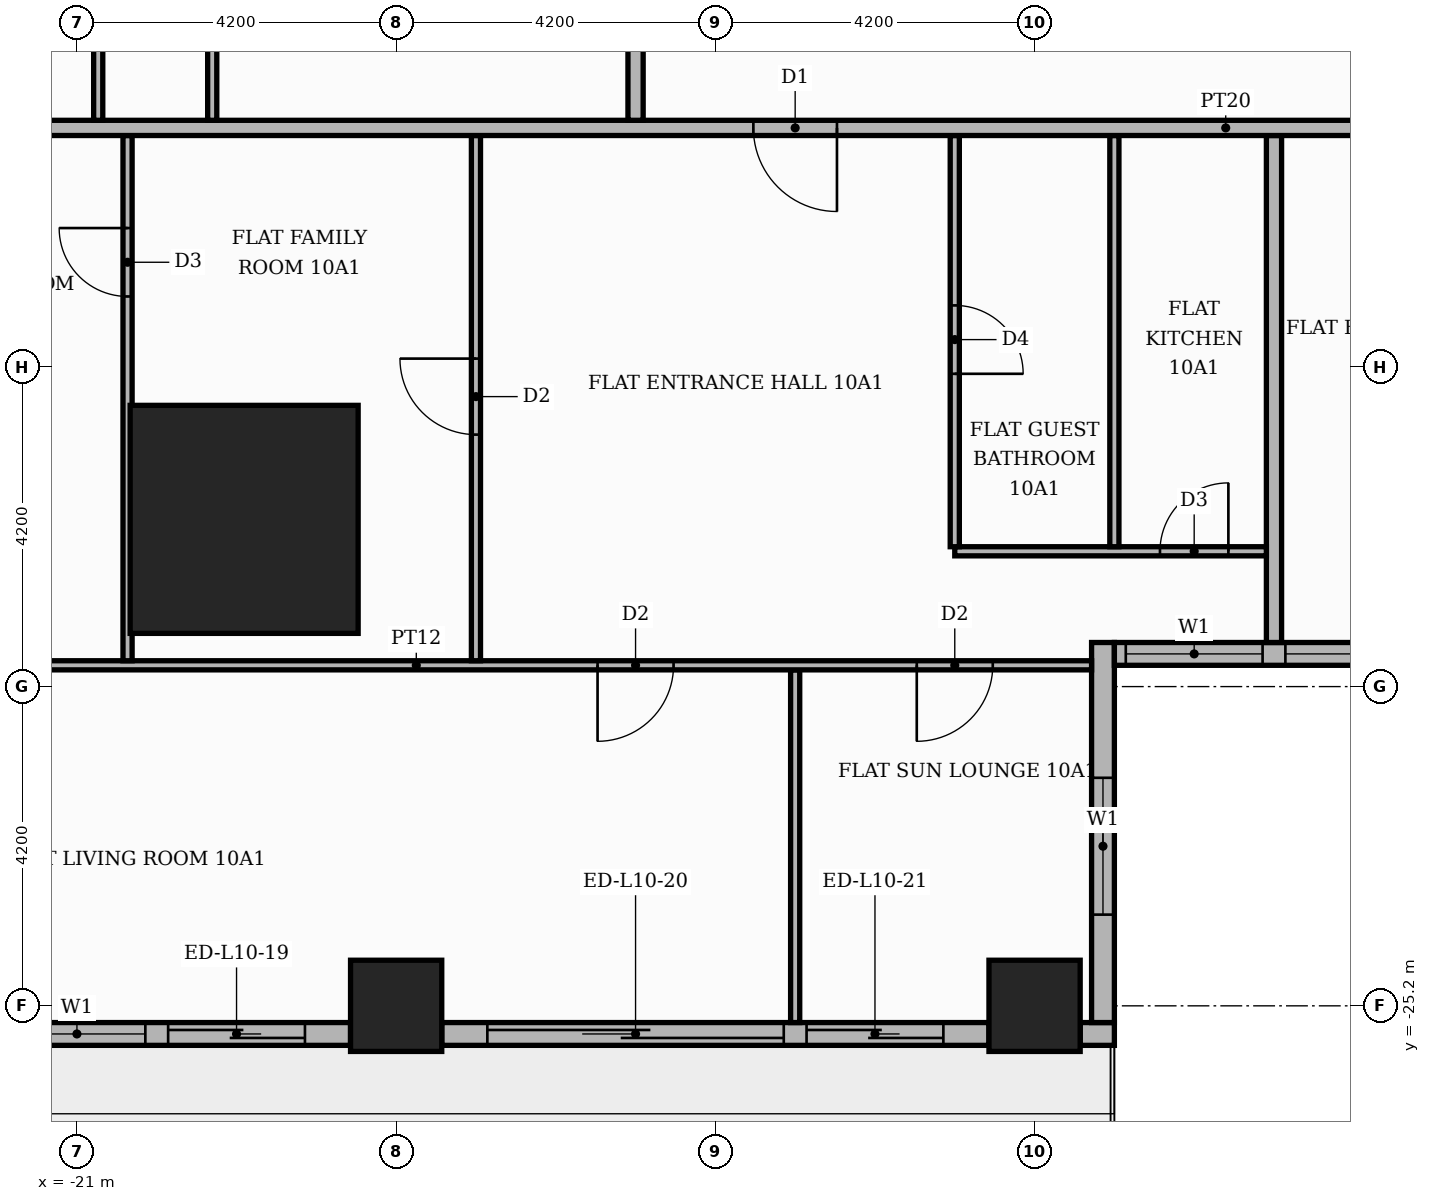
"""IFC4 building model, lengths in metres.
Left out: names, types, materials, properties, quantities, classifications, styles, units other than length and angle.
Written with IfcOpenShell. Run it as: python <this file> out.ifc"""

import sys

from ifc_helpers import new_model, si_unit, direction, frame, frame_2d, origin, origin_2d, place, context, subcontext, project, spatial, rectangle, extrude, element, fill, save


model = new_model("IFC4")
c1 = context("Model", 3, precision=1e-05, world=origin(), true_north=direction((0.0, 1.0)))
c2 = subcontext(c1, "Body", "Model", "MODEL_VIEW")
j1 = project(units=[si_unit("LENGTHUNIT", "METRE"), si_unit("PLANEANGLEUNIT", "RADIAN")], contexts=[c1])
p1 = place(None, origin())
s1 = spatial("IfcSite", under=j1, at=p1, CompositionType="ELEMENT")
p2 = place(p1, origin())
s2 = spatial("IfcBuilding", under=s1, at=p2, CompositionType="ELEMENT")
p3 = place(p2, frame((0.0, 0.0, 46.5)))
s3 = spatial("IfcBuildingStorey", under=s2, at=p3, CompositionType="ELEMENT", Elevation=46.5)
p4 = place(p3, frame((-18.8, -18.8, 0.0), z_axis=(0.0, 0.0, 1.0), x_axis=(1.0, 0.0, 0.0)))
e1 = element("IfcColumn", 1, at=p4, inside=s3, PredefinedType="COLUMN", context=c2, shape_type="SweptSolid", body=[
    extrude(rectangle(XDim=3.0, YDim=3.0, at=origin_2d()), origin(), (0.0, 0.0, 1.0), 3.9),
])
for number, where, z_axis, x_axis in (
    (2, (-8.4, -25.2, 0.0), (0.0, 0.0, 1.0), (1.0, 0.0, 0.0)),
    (3, (-16.8, -25.2, 0.0), (0.0, 0.0, 1.0), (1.0, 0.0, 0.0)),
):
    element("IfcColumn", number, at=place(p3, frame(where, z_axis=z_axis, x_axis=x_axis)), inside=s3, PredefinedType="COLUMN", context=c2, shape_type="SweptSolid", body=[
        extrude(rectangle(XDim=1.2, YDim=1.2, at=origin_2d()), origin(), (0.0, 0.0, 1.0), 3.9),
    ])
p5 = place(p3, frame((-22.42, -25.57, 0.0), z_axis=(0.0, 0.0, 1.0), x_axis=(1.0, 0.0, 0.0)))
e4 = element("IfcWall", 4, at=p5, inside=s3, PredefinedType="STANDARD", context=c2, shape_type="SweptSolid", body=[
    extrude(rectangle(XDim=5.02, YDim=0.3, at=frame_2d((2.51, 0.0))), origin(), (0.0, 0.0, 1.0), 3.48),
])
p6 = place(p5, frame((0.52, 0.0, 0.9)))
e5 = element("IfcOpeningElement", 5, at=p6, cuts=e4, PredefinedType="OPENING", context=c2, shape_type="SweptSolid", body=[
    extrude(rectangle(XDim=1.8, YDim=2.1, at=frame_2d((0.9, 1.05))), frame((0.0, 0.16, 0.0), z_axis=(0.0, -1.0, 0.0), x_axis=(1.0, 0.0, 0.0)), (0.0, 0.0, 1.0), 0.32),
])
p7 = place(p5, frame((2.62, 0.0, 0.0)))
e6 = element("IfcOpeningElement", 6, at=p7, cuts=e4, PredefinedType="OPENING", context=c2, shape_type="SweptSolid", body=[
    extrude(rectangle(XDim=1.8, YDim=2.4, at=frame_2d((0.9, 1.2))), frame((0.0, 0.16, 0.0), z_axis=(0.0, -1.0, 0.0), x_axis=(1.0, 0.0, 0.0)), (0.0, 0.0, 1.0), 0.32),
])
p8 = place(p3, frame((-16.2, -25.57, 0.0), z_axis=(0.0, 0.0, 1.0), x_axis=(1.0, 0.0, 0.0)))
e7 = element("IfcWall", 7, at=p8, inside=s3, PredefinedType="STANDARD", context=c2, shape_type="SweptSolid", body=[
    extrude(rectangle(XDim=7.2, YDim=0.3, at=frame_2d((3.6, 0.0))), origin(), (0.0, 0.0, 1.0), 3.48),
])
p9 = place(p8, frame((0.6, 0.0, 0.0)))
e8 = element("IfcOpeningElement", 8, at=p9, cuts=e7, PredefinedType="OPENING", context=c2, shape_type="SweptSolid", body=[
    extrude(rectangle(XDim=3.9, YDim=2.4, at=frame_2d((1.95, 1.2))), frame((0.0, 0.16, 0.0), z_axis=(0.0, -1.0, 0.0), x_axis=(1.0, 0.0, 0.0)), (0.0, 0.0, 1.0), 0.32),
])
p10 = place(p8, frame((4.8, 0.0, 0.0)))
e9 = element("IfcOpeningElement", 9, at=p10, cuts=e7, PredefinedType="OPENING", context=c2, shape_type="SweptSolid", body=[
    extrude(rectangle(XDim=1.8, YDim=2.4, at=frame_2d((0.9, 1.2))), frame((0.0, 0.16, 0.0), z_axis=(0.0, -1.0, 0.0), x_axis=(1.0, 0.0, 0.0)), (0.0, 0.0, 1.0), 0.32),
])
p11 = place(p3, frame((-7.8, -25.57, 0.0), z_axis=(0.0, 0.0, 1.0), x_axis=(1.0, 0.0, 0.0)))
e10 = element("IfcWall", 10, at=p11, inside=s3, PredefinedType="STANDARD", context=c2, shape_type="SweptSolid", body=[
    extrude(rectangle(XDim=0.45, YDim=0.3, at=frame_2d((0.225, 0.0))), origin(), (0.0, 0.0, 1.0), 3.48),
])
p12 = place(p3, frame((-7.5, -25.42, 0.0), z_axis=(0.0, 0.0, 1.0), x_axis=(0.0, 1.0, 0.0)))
e11 = element("IfcWall", 11, at=p12, inside=s3, PredefinedType="STANDARD", context=c2, shape_type="SweptSolid", body=[
    extrude(rectangle(XDim=5.0, YDim=0.3, at=frame_2d((2.5, 0.0))), origin(), (0.0, 0.0, 1.0), 3.48),
])
p13 = place(p12, frame((1.42, 0.0, 0.9)))
e12 = element("IfcOpeningElement", 12, at=p13, cuts=e11, PredefinedType="OPENING", context=c2, shape_type="SweptSolid", body=[
    extrude(rectangle(XDim=1.8, YDim=2.1, at=frame_2d((0.9, 1.05))), frame((0.0, 0.16, 0.0), z_axis=(0.0, -1.0, 0.0), x_axis=(1.0, 0.0, 0.0)), (0.0, 0.0, 1.0), 0.32),
])
p14 = place(p3, frame((-7.35, -20.57, 0.0), z_axis=(0.0, 0.0, 1.0), x_axis=(1.0, 0.0, 0.0)))
e13 = element("IfcWall", 13, at=p14, inside=s3, PredefinedType="STANDARD", context=c2, shape_type="SweptSolid", body=[
    extrude(rectangle(XDim=15.0, YDim=0.3, at=frame_2d((7.5, 0.0))), origin(), (0.0, 0.0, 1.0), 3.48),
])
p15 = place(p14, frame((0.15, 0.0, 0.9)))
e14 = element("IfcOpeningElement", 14, at=p15, cuts=e13, PredefinedType="OPENING", context=c2, shape_type="SweptSolid", body=[
    extrude(rectangle(XDim=1.8, YDim=2.1, at=frame_2d((0.9, 1.05))), frame((0.0, 0.16, 0.0), z_axis=(0.0, -1.0, 0.0), x_axis=(1.0, 0.0, 0.0)), (0.0, 0.0, 1.0), 0.32),
])
p16 = place(p14, frame((2.25, 0.0, 0.9)))
e15 = element("IfcOpeningElement", 15, at=p16, cuts=e13, PredefinedType="OPENING", context=c2, shape_type="SweptSolid", body=[
    extrude(rectangle(XDim=6.0, YDim=2.1, at=frame_2d((3.0, 1.05))), frame((0.0, 0.16, 0.0), z_axis=(0.0, -1.0, 0.0), x_axis=(1.0, 0.0, 0.0)), (0.0, 0.0, 1.0), 0.32),
])
p17 = place(p14, frame((8.55, 0.0, 0.9)))
e16 = element("IfcOpeningElement", 16, at=p17, cuts=e13, PredefinedType="OPENING", context=c2, shape_type="SweptSolid", body=[
    extrude(rectangle(XDim=6.0, YDim=2.1, at=frame_2d((3.0, 1.05))), frame((0.0, 0.16, 0.0), z_axis=(0.0, -1.0, 0.0), x_axis=(1.0, 0.0, 0.0)), (0.0, 0.0, 1.0), 0.32),
])
p18 = place(p3, frame((-11.55, -25.42, 0.0), z_axis=(0.0, 0.0, 1.0), x_axis=(0.0, 1.0, 0.0)))
e17 = element("IfcWall", 17, at=p18, inside=s3, PredefinedType="PARTITIONING", context=c2, shape_type="SweptSolid", body=[
    extrude(rectangle(XDim=4.64, YDim=0.12, at=frame_2d((2.32, 0.0))), origin(), (0.0, 0.0, 1.0), 3.48),
])
p19 = place(p3, frame((-25.42, -20.72, 0.0), z_axis=(0.0, 0.0, 1.0), x_axis=(1.0, 0.0, 0.0)))
e18 = element("IfcWall", 18, at=p19, inside=s3, PredefinedType="PARTITIONING", context=c2, shape_type="SweptSolid", body=[
    extrude(rectangle(XDim=17.77, YDim=0.12, at=frame_2d((8.885, 0.0))), origin(), (0.0, 0.0, 1.0), 3.48),
])
p20 = place(p19, frame((11.27, 0.0, 0.0)))
e19 = element("IfcOpeningElement", 19, at=p20, cuts=e18, PredefinedType="OPENING", context=c2, shape_type="SweptSolid", body=[
    extrude(rectangle(XDim=1.0, YDim=2.1, at=frame_2d((0.5, 1.05))), frame((0.0, 0.07, 0.0), z_axis=(0.0, -1.0, 0.0), x_axis=(1.0, 0.0, 0.0)), (0.0, 0.0, 1.0), 0.14),
])
p21 = place(p19, frame((15.47, 0.0, 0.0)))
e20 = element("IfcOpeningElement", 20, at=p21, cuts=e18, PredefinedType="OPENING", context=c2, shape_type="SweptSolid", body=[
    extrude(rectangle(XDim=1.0, YDim=2.1, at=frame_2d((0.5, 1.05))), frame((0.0, 0.07, 0.0), z_axis=(0.0, -1.0, 0.0), x_axis=(1.0, 0.0, 0.0)), (0.0, 0.0, 1.0), 0.14),
])
p22 = place(p3, frame((-5.25, -20.42, 0.0), z_axis=(0.0, 0.0, 1.0), x_axis=(0.0, 1.0, 0.0)))
e21 = element("IfcWall", 21, at=p22, inside=s3, PredefinedType="PARTITIONING", context=c2, shape_type="SweptSolid", body=[
    extrude(rectangle(XDim=6.67, YDim=0.2, at=frame_2d((3.335, 0.0))), origin(), (0.0, 0.0, 1.0), 3.48),
])
p23 = place(p3, frame((-20.334, -20.66, 0.0), z_axis=(0.0, 0.0, 1.0), x_axis=(0.0, 1.0, 0.0)))
e22 = element("IfcWall", 22, at=p23, inside=s3, PredefinedType="PARTITIONING", context=c2, shape_type="SweptSolid", body=[
    extrude(rectangle(XDim=6.91, YDim=0.12, at=frame_2d((3.455, 0.0))), origin(), (0.0, 0.0, 1.0), 3.48),
])
p24 = place(p23, frame((4.792, 0.0, 0.0)))
e23 = element("IfcOpeningElement", 23, at=p24, cuts=e22, PredefinedType="OPENING", context=c2, shape_type="SweptSolid", body=[
    extrude(rectangle(XDim=0.9, YDim=2.1, at=frame_2d((0.45, 1.05))), frame((0.0, 0.07, 0.0), z_axis=(0.0, -1.0, 0.0), x_axis=(1.0, 0.0, 0.0)), (0.0, 0.0, 1.0), 0.14),
])
p25 = place(p3, frame((-15.75, -20.66, 0.0), z_axis=(0.0, 0.0, 1.0), x_axis=(0.0, 1.0, 0.0)))
e24 = element("IfcWall", 24, at=p25, inside=s3, PredefinedType="PARTITIONING", context=c2, shape_type="SweptSolid", body=[
    extrude(rectangle(XDim=6.91, YDim=0.12, at=frame_2d((3.455, 0.0))), origin(), (0.0, 0.0, 1.0), 3.48),
])
p26 = place(p25, frame((2.975, 0.0, 0.0)))
e25 = element("IfcOpeningElement", 25, at=p26, cuts=e24, PredefinedType="OPENING", context=c2, shape_type="SweptSolid", body=[
    extrude(rectangle(XDim=1.0, YDim=2.1, at=frame_2d((0.5, 1.05))), frame((0.0, 0.07, 0.0), z_axis=(0.0, -1.0, 0.0), x_axis=(1.0, 0.0, 0.0)), (0.0, 0.0, 1.0), 0.14),
])
p27 = place(p3, frame((-9.45, -19.22, 0.0), z_axis=(0.0, 0.0, 1.0), x_axis=(1.0, 0.0, 0.0)))
e26 = element("IfcWall", 26, at=p27, inside=s3, PredefinedType="PARTITIONING", context=c2, shape_type="SweptSolid", body=[
    extrude(rectangle(XDim=4.1, YDim=0.12, at=frame_2d((2.05, 0.0))), origin(), (0.0, 0.0, 1.0), 3.48),
])
p28 = place(p27, frame((2.7, 0.0, 0.0)))
e27 = element("IfcOpeningElement", 27, at=p28, cuts=e26, PredefinedType="OPENING", context=c2, shape_type="SweptSolid", body=[
    extrude(rectangle(XDim=0.9, YDim=2.1, at=frame_2d((0.45, 1.05))), frame((0.0, 0.07, 0.0), z_axis=(0.0, -1.0, 0.0), x_axis=(1.0, 0.0, 0.0)), (0.0, 0.0, 1.0), 0.14),
])
p29 = place(p3, frame((-9.45, -19.16, 0.0), z_axis=(0.0, 0.0, 1.0), x_axis=(0.0, 1.0, 0.0)))
e28 = element("IfcWall", 28, at=p29, inside=s3, PredefinedType="PARTITIONING", context=c2, shape_type="SweptSolid", body=[
    extrude(rectangle(XDim=5.41, YDim=0.12, at=frame_2d((2.705, 0.0))), origin(), (0.0, 0.0, 1.0), 3.48),
])
p30 = place(p29, frame((2.275, 0.0, 0.0)))
e29 = element("IfcOpeningElement", 29, at=p30, cuts=e28, PredefinedType="OPENING", context=c2, shape_type="SweptSolid", body=[
    extrude(rectangle(XDim=0.9, YDim=2.1, at=frame_2d((0.45, 1.05))), frame((0.0, 0.07, 0.0), z_axis=(0.0, -1.0, 0.0), x_axis=(1.0, 0.0, 0.0)), (0.0, 0.0, 1.0), 0.14),
])
p31 = place(p3, frame((-7.35, -19.16, 0.0), z_axis=(0.0, 0.0, 1.0), x_axis=(0.0, 1.0, 0.0)))
e30 = element("IfcWall", 30, at=p31, inside=s3, PredefinedType="PARTITIONING", context=c2, shape_type="SweptSolid", body=[
    extrude(rectangle(XDim=5.41, YDim=0.12, at=frame_2d((2.705, 0.0))), origin(), (0.0, 0.0, 1.0), 3.48),
])
p32 = place(p3, frame((-25.42, -13.65, 0.0), z_axis=(0.0, 0.0, 1.0), x_axis=(1.0, 0.0, 0.0)))
e31 = element("IfcWall", 31, at=p32, inside=s3, PredefinedType="PARTITIONING", context=c2, shape_type="SweptSolid", body=[
    extrude(rectangle(XDim=39.07, YDim=0.2, at=frame_2d((19.535, 0.0))), origin(), (0.0, 0.0, 1.0), 3.48),
])
p33 = place(p32, frame((13.32, 0.0, 0.0)))
e32 = element("IfcOpeningElement", 32, at=p33, cuts=e31, PredefinedType="OPENING", context=c2, shape_type="SweptSolid", body=[
    extrude(rectangle(XDim=1.1, YDim=2.4, at=frame_2d((0.55, 1.2))), frame((0.0, 0.11, 0.0), z_axis=(0.0, -1.0, 0.0), x_axis=(1.0, 0.0, 0.0)), (0.0, 0.0, 1.0), 0.22),
])
p34 = place(p32, frame((21.72, 0.0, 0.0)))
e33 = element("IfcOpeningElement", 33, at=p34, cuts=e31, PredefinedType="OPENING", context=c2, shape_type="SweptSolid", body=[
    extrude(rectangle(XDim=1.1, YDim=2.4, at=frame_2d((0.55, 1.2))), frame((0.0, 0.11, 0.0), z_axis=(0.0, -1.0, 0.0), x_axis=(1.0, 0.0, 0.0)), (0.0, 0.0, 1.0), 0.22),
])
p35 = place(p3, frame((-20.72, -13.55, 0.0), z_axis=(0.0, 0.0, 1.0), x_axis=(0.0, 1.0, 0.0)))
e34 = element("IfcWall", 34, at=p35, inside=s3, PredefinedType="PARTITIONING", context=c2, shape_type="SweptSolid", body=[
    extrude(rectangle(XDim=1.94, YDim=0.12, at=frame_2d((0.97, 0.0))), origin(), (0.0, 0.0, 1.0), 3.48),
])
p36 = place(p3, frame((-19.22, -13.55, 0.0), z_axis=(0.0, 0.0, 1.0), x_axis=(0.0, 1.0, 0.0)))
e35 = element("IfcWall", 35, at=p36, inside=s3, PredefinedType="PARTITIONING", context=c2, shape_type="SweptSolid", body=[
    extrude(rectangle(XDim=3.74, YDim=0.12, at=frame_2d((1.87, 0.0))), origin(), (0.0, 0.0, 1.0), 3.48),
])
p37 = place(p36, frame((1.4, 0.0, 0.0)))
e36 = element("IfcOpeningElement", 36, at=p37, cuts=e35, PredefinedType="OPENING", context=c2, shape_type="SweptSolid", body=[
    extrude(rectangle(XDim=0.9, YDim=2.1, at=frame_2d((0.45, 1.05))), frame((0.0, 0.07, 0.0), z_axis=(0.0, -1.0, 0.0), x_axis=(1.0, 0.0, 0.0)), (0.0, 0.0, 1.0), 0.14),
])
p38 = place(p3, frame((-13.65, -13.55, 0.0), z_axis=(0.0, 0.0, 1.0), x_axis=(0.0, 1.0, 0.0)))
e37 = element("IfcWall", 37, at=p38, inside=s3, PredefinedType="PARTITIONING", context=c2, shape_type="SweptSolid", body=[
    extrude(rectangle(XDim=27.1, YDim=0.2, at=frame_2d((13.55, 0.0))), origin(), (0.0, 0.0, 1.0), 3.48),
])
p39 = place(p38, frame((24.55, 0.0, 0.0)))
e38 = element("IfcOpeningElement", 38, at=p39, cuts=e37, PredefinedType="OPENING", context=c2, shape_type="SweptSolid", body=[
    extrude(rectangle(XDim=1.1, YDim=2.4, at=frame_2d((0.55, 1.2))), frame((0.0, 0.11, 0.0), z_axis=(0.0, -1.0, 0.0), x_axis=(1.0, 0.0, 0.0)), (0.0, 0.0, 1.0), 0.22),
])
p40 = place(p6, origin())
e39 = element("IfcWindow", 39, at=p40, inside=s3, PartitioningType="SINGLE_PANEL", PredefinedType="WINDOW", context=c2, shape_type="SweptSolid", body=[
    extrude(rectangle(XDim=1.8, YDim=2.1, at=frame_2d((0.9, 1.05))), frame((0.0, 0.03, 0.0), z_axis=(0.0, -1.0, 0.0), x_axis=(1.0, 0.0, 0.0)), (0.0, 0.0, 1.0), 0.06),
])
fill(e5, e39)
p41 = place(p7, origin())
e40 = element("IfcDoor", 40, at=p41, inside=s3, OperationType="SLIDING_TO_RIGHT", PredefinedType="DOOR", context=c2, shape_type="SweptSolid", body=[
    extrude(rectangle(XDim=1.8, YDim=2.4, at=frame_2d((0.9, 1.2))), frame((0.0, 0.025, 0.0), z_axis=(0.0, -1.0, 0.0), x_axis=(1.0, 0.0, 0.0)), (0.0, 0.0, 1.0), 0.05),
])
fill(e6, e40)
p42 = place(p9, origin())
e41 = element("IfcDoor", 41, at=p42, inside=s3, OperationType="SLIDING_TO_LEFT", PredefinedType="DOOR", context=c2, shape_type="SweptSolid", body=[
    extrude(rectangle(XDim=3.9, YDim=2.4, at=frame_2d((1.95, 1.2))), frame((0.0, 0.025, 0.0), z_axis=(0.0, -1.0, 0.0), x_axis=(1.0, 0.0, 0.0)), (0.0, 0.0, 1.0), 0.05),
])
fill(e8, e41)
p43 = place(p10, origin())
e42 = element("IfcDoor", 42, at=p43, inside=s3, OperationType="SLIDING_TO_RIGHT", PredefinedType="DOOR", context=c2, shape_type="SweptSolid", body=[
    extrude(rectangle(XDim=1.8, YDim=2.4, at=frame_2d((0.9, 1.2))), frame((0.0, 0.025, 0.0), z_axis=(0.0, -1.0, 0.0), x_axis=(1.0, 0.0, 0.0)), (0.0, 0.0, 1.0), 0.05),
])
fill(e9, e42)
p44 = place(p13, origin())
e43 = element("IfcWindow", 43, at=p44, inside=s3, PartitioningType="SINGLE_PANEL", PredefinedType="WINDOW", context=c2, shape_type="SweptSolid", body=[
    extrude(rectangle(XDim=1.8, YDim=2.1, at=frame_2d((0.9, 1.05))), frame((0.0, 0.03, 0.0), z_axis=(0.0, -1.0, 0.0), x_axis=(1.0, 0.0, 0.0)), (0.0, 0.0, 1.0), 0.06),
])
fill(e12, e43)
p45 = place(p15, origin())
e44 = element("IfcWindow", 44, at=p45, inside=s3, PartitioningType="SINGLE_PANEL", PredefinedType="WINDOW", context=c2, shape_type="SweptSolid", body=[
    extrude(rectangle(XDim=1.8, YDim=2.1, at=frame_2d((0.9, 1.05))), frame((0.0, 0.03, 0.0), z_axis=(0.0, -1.0, 0.0), x_axis=(1.0, 0.0, 0.0)), (0.0, 0.0, 1.0), 0.06),
])
fill(e14, e44)
p46 = place(p16, origin())
e45 = element("IfcWindow", 45, at=p46, inside=s3, PartitioningType="SINGLE_PANEL", PredefinedType="WINDOW", context=c2, shape_type="SweptSolid", body=[
    extrude(rectangle(XDim=6.0, YDim=2.1, at=frame_2d((3.0, 1.05))), frame((0.0, 0.03, 0.0), z_axis=(0.0, -1.0, 0.0), x_axis=(1.0, 0.0, 0.0)), (0.0, 0.0, 1.0), 0.06),
])
fill(e15, e45)
p47 = place(p33, frame((1.1, 0.0, 0.0), z_axis=(0.0, 0.0, 1.0), x_axis=(-1.0, 0.0, 0.0)))
e46 = element("IfcDoor", 46, at=p47, inside=s3, OperationType="SINGLE_SWING_RIGHT", PredefinedType="DOOR", context=c2, shape_type="SweptSolid", body=[
    extrude(rectangle(XDim=1.1, YDim=2.4, at=frame_2d((0.55, 1.2))), frame((0.0, 0.025, 0.0), z_axis=(0.0, -1.0, 0.0), x_axis=(1.0, 0.0, 0.0)), (0.0, 0.0, 1.0), 0.05),
])
fill(e32, e46)
p48 = place(p24, origin())
e47 = element("IfcDoor", 47, at=p48, inside=s3, OperationType="SINGLE_SWING_RIGHT", PredefinedType="DOOR", context=c2, shape_type="SweptSolid", body=[
    extrude(rectangle(XDim=0.9, YDim=2.1, at=frame_2d((0.45, 1.05))), frame((0.0, 0.025, 0.0), z_axis=(0.0, -1.0, 0.0), x_axis=(1.0, 0.0, 0.0)), (0.0, 0.0, 1.0), 0.05),
])
fill(e23, e47)
p49 = place(p26, origin())
e48 = element("IfcDoor", 48, at=p49, inside=s3, OperationType="SINGLE_SWING_RIGHT", PredefinedType="DOOR", context=c2, shape_type="SweptSolid", body=[
    extrude(rectangle(XDim=1.0, YDim=2.1, at=frame_2d((0.5, 1.05))), frame((0.0, 0.025, 0.0), z_axis=(0.0, -1.0, 0.0), x_axis=(1.0, 0.0, 0.0)), (0.0, 0.0, 1.0), 0.05),
])
fill(e25, e48)
p50 = place(p30, frame((0.9, 0.0, 0.0), z_axis=(0.0, 0.0, 1.0), x_axis=(-1.0, 0.0, 0.0)))
e49 = element("IfcDoor", 49, at=p50, inside=s3, OperationType="SINGLE_SWING_LEFT", PredefinedType="DOOR", context=c2, shape_type="SweptSolid", body=[
    extrude(rectangle(XDim=0.9, YDim=2.1, at=frame_2d((0.45, 1.05))), frame((0.0, 0.025, 0.0), z_axis=(0.0, -1.0, 0.0), x_axis=(1.0, 0.0, 0.0)), (0.0, 0.0, 1.0), 0.05),
])
fill(e29, e49)
p51 = place(p28, origin())
e50 = element("IfcDoor", 50, at=p51, inside=s3, OperationType="SINGLE_SWING_RIGHT", PredefinedType="DOOR", context=c2, shape_type="SweptSolid", body=[
    extrude(rectangle(XDim=0.9, YDim=2.1, at=frame_2d((0.45, 1.05))), frame((0.0, 0.025, 0.0), z_axis=(0.0, -1.0, 0.0), x_axis=(1.0, 0.0, 0.0)), (0.0, 0.0, 1.0), 0.05),
])
fill(e27, e50)
p52 = place(p20, frame((1.0, 0.0, 0.0), z_axis=(0.0, 0.0, 1.0), x_axis=(-1.0, 0.0, 0.0)))
e51 = element("IfcDoor", 51, at=p52, inside=s3, OperationType="SINGLE_SWING_LEFT", PredefinedType="DOOR", context=c2, shape_type="SweptSolid", body=[
    extrude(rectangle(XDim=1.0, YDim=2.1, at=frame_2d((0.5, 1.05))), frame((0.0, 0.025, 0.0), z_axis=(0.0, -1.0, 0.0), x_axis=(1.0, 0.0, 0.0)), (0.0, 0.0, 1.0), 0.05),
])
fill(e19, e51)
p53 = place(p21, frame((1.0, 0.0, 0.0), z_axis=(0.0, 0.0, 1.0), x_axis=(-1.0, 0.0, 0.0)))
e52 = element("IfcDoor", 52, at=p53, inside=s3, OperationType="SINGLE_SWING_LEFT", PredefinedType="DOOR", context=c2, shape_type="SweptSolid", body=[
    extrude(rectangle(XDim=1.0, YDim=2.1, at=frame_2d((0.5, 1.05))), frame((0.0, 0.025, 0.0), z_axis=(0.0, -1.0, 0.0), x_axis=(1.0, 0.0, 0.0)), (0.0, 0.0, 1.0), 0.05),
])
fill(e20, e52)
save(model, sys.argv[1])
